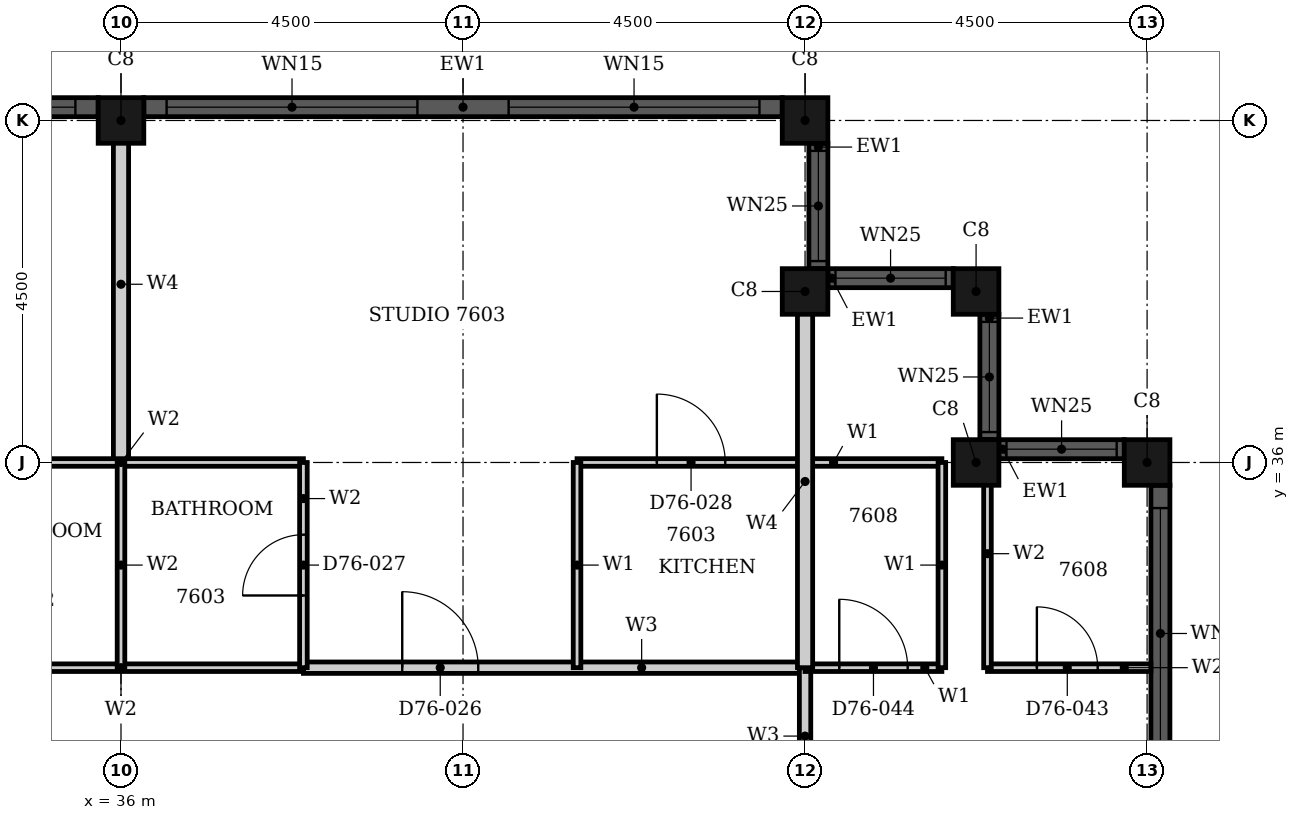
"""IFC4 building model, lengths in metres.
Left out: names, types, materials, properties, quantities, classifications, styles, units other than length and angle.
Written with IfcOpenShell. Run it as: python <this file> out.ifc"""

import sys

from ifc_helpers import new_model, si_unit, direction, frame, frame_2d, origin, origin_2d, place, context, subcontext, project, spatial, rectangle, hollow_rectangle, extrude, element, fill, save


model = new_model("IFC4")
c1 = context("Model", 3, precision=1e-05, world=origin(), true_north=direction((0.0, 1.0)))
c2 = subcontext(c1, "Body", "Model", "MODEL_VIEW")
j1 = project(units=[si_unit("LENGTHUNIT", "METRE"), si_unit("PLANEANGLEUNIT", "RADIAN")], contexts=[c1])
p1 = place(None, origin())
s1 = spatial("IfcSite", under=j1, at=p1, CompositionType="ELEMENT")
p2 = place(p1, origin())
s2 = spatial("IfcBuilding", under=s1, at=p2, CompositionType="ELEMENT")
p3 = place(p2, frame((0.0, 0.0, 298.2)))
s3 = spatial("IfcBuildingStorey", under=s2, at=p3, CompositionType="ELEMENT", Elevation=298.2)
for number, where, z_axis, x_axis in (
    (1, (49.5, 36.0, 0.0), (0.0, 0.0, 1.0), (1.0, 0.0, 0.0)),
    (2, (47.25, 36.0, 0.0), (0.0, 0.0, 1.0), (1.0, 0.0, 0.0)),
    (3, (47.25, 38.25, 0.0), (0.0, 0.0, 1.0), (1.0, 0.0, 0.0)),
    (4, (45.0, 38.25, 0.0), (0.0, 0.0, 1.0), (1.0, 0.0, 0.0)),
    (5, (45.0, 40.5, 0.0), (0.0, 0.0, 1.0), (1.0, 0.0, 0.0)),
    (6, (36.0, 40.5, 0.0), (0.0, 0.0, 1.0), (1.0, 0.0, 0.0)),
):
    element("IfcColumn", number, at=place(p3, frame(where, z_axis=z_axis, x_axis=x_axis)), inside=s3, PredefinedType="COLUMN", context=c2, shape_type="SweptSolid", body=[
        extrude(hollow_rectangle(XDim=0.6, YDim=0.6, WallThickness=0.02, at=origin_2d()), origin(), (0.0, 0.0, 1.0), 3.7),
    ])
p4 = place(p3, frame((49.675, 27.3, 0.0), z_axis=(0.0, 0.0, 1.0), x_axis=(0.0, 1.0, 0.0)))
e7 = element("IfcWall", 7, at=p4, inside=s3, PredefinedType="SOLIDWALL", context=c2, shape_type="SweptSolid", body=[
    extrude(rectangle(XDim=8.4, YDim=0.25, at=frame_2d((4.2, 0.0))), origin(), (0.0, 0.0, 1.0), 3.7),
])
p5 = place(p4, frame((0.3, 0.0, 0.45)))
e8 = element("IfcOpeningElement", 8, at=p5, cuts=e7, PredefinedType="OPENING", context=c2, shape_type="SweptSolid", body=[
    extrude(rectangle(XDim=3.3, YDim=2.3, at=frame_2d((1.65, 1.15))), frame((0.0, 0.135, 0.0), z_axis=(0.0, -1.0, 0.0), x_axis=(1.0, 0.0, 0.0)), (0.0, 0.0, 1.0), 0.27),
])
p6 = place(p4, frame((4.8, 0.0, 0.45)))
e9 = element("IfcOpeningElement", 9, at=p6, cuts=e7, PredefinedType="OPENING", context=c2, shape_type="SweptSolid", body=[
    extrude(rectangle(XDim=3.3, YDim=2.3, at=frame_2d((1.65, 1.15))), frame((0.0, 0.135, 0.0), z_axis=(0.0, -1.0, 0.0), x_axis=(1.0, 0.0, 0.0)), (0.0, 0.0, 1.0), 0.27),
])
p7 = place(p3, frame((49.2, 36.175, 0.0), z_axis=(0.0, 0.0, 1.0), x_axis=(-1.0, 0.0, 0.0)))
e10 = element("IfcWall", 10, at=p7, inside=s3, PredefinedType="SOLIDWALL", context=c2, shape_type="SweptSolid", body=[
    extrude(rectangle(XDim=1.65, YDim=0.25, at=frame_2d((0.825, 0.0))), origin(), (0.0, 0.0, 1.0), 3.7),
])
p8 = place(p7, frame((0.1, 0.0, 0.9)))
e11 = element("IfcOpeningElement", 11, at=p8, cuts=e10, PredefinedType="OPENING", context=c2, shape_type="SweptSolid", body=[
    extrude(rectangle(XDim=1.45, YDim=1.85, at=frame_2d((0.725, 0.925))), frame((0.0, 0.135, 0.0), z_axis=(0.0, -1.0, 0.0), x_axis=(1.0, 0.0, 0.0)), (0.0, 0.0, 1.0), 0.27),
])
p9 = place(p3, frame((47.425, 36.3, 0.0), z_axis=(0.0, 0.0, 1.0), x_axis=(0.0, 1.0, 0.0)))
e12 = element("IfcWall", 12, at=p9, inside=s3, PredefinedType="SOLIDWALL", context=c2, shape_type="SweptSolid", body=[
    extrude(rectangle(XDim=1.65, YDim=0.25, at=frame_2d((0.825, 0.0))), origin(), (0.0, 0.0, 1.0), 3.7),
])
p10 = place(p9, frame((0.1, 0.0, 0.9)))
e13 = element("IfcOpeningElement", 13, at=p10, cuts=e12, PredefinedType="OPENING", context=c2, shape_type="SweptSolid", body=[
    extrude(rectangle(XDim=1.45, YDim=1.85, at=frame_2d((0.725, 0.925))), frame((0.0, 0.135, 0.0), z_axis=(0.0, -1.0, 0.0), x_axis=(1.0, 0.0, 0.0)), (0.0, 0.0, 1.0), 0.27),
])
p11 = place(p3, frame((46.95, 38.425, 0.0), z_axis=(0.0, 0.0, 1.0), x_axis=(-1.0, 0.0, 0.0)))
e14 = element("IfcWall", 14, at=p11, inside=s3, PredefinedType="SOLIDWALL", context=c2, shape_type="SweptSolid", body=[
    extrude(rectangle(XDim=1.65, YDim=0.25, at=frame_2d((0.825, 0.0))), origin(), (0.0, 0.0, 1.0), 3.7),
])
p12 = place(p11, frame((0.1, 0.0, 0.9)))
e15 = element("IfcOpeningElement", 15, at=p12, cuts=e14, PredefinedType="OPENING", context=c2, shape_type="SweptSolid", body=[
    extrude(rectangle(XDim=1.45, YDim=1.85, at=frame_2d((0.725, 0.925))), frame((0.0, 0.135, 0.0), z_axis=(0.0, -1.0, 0.0), x_axis=(1.0, 0.0, 0.0)), (0.0, 0.0, 1.0), 0.27),
])
p13 = place(p3, frame((45.175, 38.55, 0.0), z_axis=(0.0, 0.0, 1.0), x_axis=(0.0, 1.0, 0.0)))
e16 = element("IfcWall", 16, at=p13, inside=s3, PredefinedType="SOLIDWALL", context=c2, shape_type="SweptSolid", body=[
    extrude(rectangle(XDim=1.65, YDim=0.25, at=frame_2d((0.825, 0.0))), origin(), (0.0, 0.0, 1.0), 3.7),
])
p14 = place(p13, frame((0.1, 0.0, 0.9)))
e17 = element("IfcOpeningElement", 17, at=p14, cuts=e16, PredefinedType="OPENING", context=c2, shape_type="SweptSolid", body=[
    extrude(rectangle(XDim=1.45, YDim=1.85, at=frame_2d((0.725, 0.925))), frame((0.0, 0.135, 0.0), z_axis=(0.0, -1.0, 0.0), x_axis=(1.0, 0.0, 0.0)), (0.0, 0.0, 1.0), 0.27),
])
p15 = place(p3, frame((44.7, 40.675, 0.0), z_axis=(0.0, 0.0, 1.0), x_axis=(-1.0, 0.0, 0.0)))
e18 = element("IfcWall", 18, at=p15, inside=s3, PredefinedType="SOLIDWALL", context=c2, shape_type="SweptSolid", body=[
    extrude(rectangle(XDim=8.4, YDim=0.25, at=frame_2d((4.2, 0.0))), origin(), (0.0, 0.0, 1.0), 3.7),
])
p16 = place(p15, frame((0.3, 0.0, 0.45)))
e19 = element("IfcOpeningElement", 19, at=p16, cuts=e18, PredefinedType="OPENING", context=c2, shape_type="SweptSolid", body=[
    extrude(rectangle(XDim=3.3, YDim=2.3, at=frame_2d((1.65, 1.15))), frame((0.0, 0.135, 0.0), z_axis=(0.0, -1.0, 0.0), x_axis=(1.0, 0.0, 0.0)), (0.0, 0.0, 1.0), 0.27),
])
p17 = place(p15, frame((4.8, 0.0, 0.45)))
e20 = element("IfcOpeningElement", 20, at=p17, cuts=e18, PredefinedType="OPENING", context=c2, shape_type="SweptSolid", body=[
    extrude(rectangle(XDim=3.3, YDim=2.3, at=frame_2d((1.65, 1.15))), frame((0.0, 0.135, 0.0), z_axis=(0.0, -1.0, 0.0), x_axis=(1.0, 0.0, 0.0)), (0.0, 0.0, 1.0), 0.27),
])
p18 = place(p3, frame((35.7, 40.675, 0.0), z_axis=(0.0, 0.0, 1.0), x_axis=(-1.0, 0.0, 0.0)))
e21 = element("IfcWall", 21, at=p18, inside=s3, PredefinedType="SOLIDWALL", context=c2, shape_type="SweptSolid", body=[
    extrude(rectangle(XDim=8.4, YDim=0.25, at=frame_2d((4.2, 0.0))), origin(), (0.0, 0.0, 1.0), 3.7),
])
p19 = place(p18, frame((0.3, 0.0, 0.45)))
e22 = element("IfcOpeningElement", 22, at=p19, cuts=e21, PredefinedType="OPENING", context=c2, shape_type="SweptSolid", body=[
    extrude(rectangle(XDim=3.3, YDim=2.3, at=frame_2d((1.65, 1.15))), frame((0.0, 0.135, 0.0), z_axis=(0.0, -1.0, 0.0), x_axis=(1.0, 0.0, 0.0)), (0.0, 0.0, 1.0), 0.27),
])
p20 = place(p18, frame((4.8, 0.0, 0.45)))
e23 = element("IfcOpeningElement", 23, at=p20, cuts=e21, PredefinedType="OPENING", context=c2, shape_type="SweptSolid", body=[
    extrude(rectangle(XDim=3.3, YDim=2.3, at=frame_2d((1.65, 1.15))), frame((0.0, 0.135, 0.0), z_axis=(0.0, -1.0, 0.0), x_axis=(1.0, 0.0, 0.0)), (0.0, 0.0, 1.0), 0.27),
])
p21 = place(p3, frame((38.4, 33.3, 0.0), z_axis=(0.0, 0.0, 1.0), x_axis=(1.0, 0.0, 0.0)))
e24 = element("IfcWall", 24, at=p21, inside=s3, PredefinedType="PARTITIONING", context=c2, shape_type="SweptSolid", body=[
    extrude(rectangle(XDim=6.6, YDim=0.15, at=frame_2d((3.3, 0.0))), origin(), (0.0, 0.0, 1.0), 3.4),
])
p22 = place(p21, frame((1.3, 0.0, 0.0)))
e25 = element("IfcOpeningElement", 25, at=p22, cuts=e24, PredefinedType="OPENING", context=c2, shape_type="SweptSolid", body=[
    extrude(rectangle(XDim=1.0, YDim=2.2, at=frame_2d((0.5, 1.1))), frame((0.0, 0.085, 0.0), z_axis=(0.0, -1.0, 0.0), x_axis=(1.0, 0.0, 0.0)), (0.0, 0.0, 1.0), 0.17),
])
p23 = place(p3, frame((45.0, 31.5, 0.0), z_axis=(0.0, 0.0, 1.0), x_axis=(0.0, 1.0, 0.0)))
e26 = element("IfcWall", 26, at=p23, inside=s3, PredefinedType="PARTITIONING", context=c2, shape_type="SweptSolid", body=[
    extrude(rectangle(XDim=1.8, YDim=0.15, at=frame_2d((0.9, 0.0))), origin(), (0.0, 0.0, 1.0), 3.4),
])
p24 = place(p3, frame((45.0, 33.3, 0.0), z_axis=(0.0, 0.0, 1.0), x_axis=(1.0, 0.0, 0.0)))
e27 = element("IfcWall", 27, at=p24, inside=s3, PredefinedType="PARTITIONING", context=c2, shape_type="SweptSolid", body=[
    extrude(rectangle(XDim=1.8, YDim=0.1, at=frame_2d((0.9, 0.0))), origin(), (0.0, 0.0, 1.0), 3.4),
])
p25 = place(p24, frame((0.45, 0.0, 0.0)))
e28 = element("IfcOpeningElement", 28, at=p25, cuts=e27, PredefinedType="OPENING", context=c2, shape_type="SweptSolid", body=[
    extrude(rectangle(XDim=0.9, YDim=2.1, at=frame_2d((0.45, 1.05))), frame((0.0, 0.06, 0.0), z_axis=(0.0, -1.0, 0.0), x_axis=(1.0, 0.0, 0.0)), (0.0, 0.0, 1.0), 0.12),
])
p26 = place(p3, frame((42.0, 36.0, 0.0), z_axis=(0.0, 0.0, 1.0), x_axis=(1.0, 0.0, 0.0)))
e29 = element("IfcWall", 29, at=p26, inside=s3, PredefinedType="PARTITIONING", context=c2, shape_type="SweptSolid", body=[
    extrude(rectangle(XDim=4.8, YDim=0.1, at=frame_2d((2.4, 0.0))), origin(), (0.0, 0.0, 1.0), 3.4),
])
p27 = place(p26, frame((1.05, 0.0, 0.0)))
e30 = element("IfcOpeningElement", 30, at=p27, cuts=e29, PredefinedType="OPENING", context=c2, shape_type="SweptSolid", body=[
    extrude(rectangle(XDim=0.9, YDim=2.1, at=frame_2d((0.45, 1.05))), frame((0.0, 0.06, 0.0), z_axis=(0.0, -1.0, 0.0), x_axis=(1.0, 0.0, 0.0)), (0.0, 0.0, 1.0), 0.12),
])
for number, where, z_axis, x_axis in (
    (31, (42.0, 33.3, 0.0), (0.0, 0.0, 1.0), (0.0, 1.0, 0.0)),
    (32, (46.8, 33.3, 0.0), (0.0, 0.0, 1.0), (0.0, 1.0, 0.0)),
):
    element("IfcWall", number, at=place(p3, frame(where, z_axis=z_axis, x_axis=x_axis)), inside=s3, PredefinedType="PARTITIONING", context=c2, shape_type="SweptSolid", body=[
        extrude(rectangle(XDim=2.7, YDim=0.1, at=frame_2d((1.35, 0.0))), origin(), (0.0, 0.0, 1.0), 3.4),
    ])
p28 = place(p3, frame((36.0, 36.0, 0.0), z_axis=(0.0, 0.0, 1.0), x_axis=(0.0, 1.0, 0.0)))
e33 = element("IfcWall", 33, at=p28, inside=s3, PredefinedType="PARTITIONING", context=c2, shape_type="SweptSolid", body=[
    extrude(rectangle(XDim=4.69, YDim=0.2, at=frame_2d((2.345, 0.0))), origin(), (0.0, 0.0, 1.0), 3.4),
])
p29 = place(p3, frame((45.0, 33.3, 0.0), z_axis=(0.0, 0.0, 1.0), x_axis=(0.0, 1.0, 0.0)))
e34 = element("IfcWall", 34, at=p29, inside=s3, PredefinedType="PARTITIONING", context=c2, shape_type="SweptSolid", body=[
    extrude(rectangle(XDim=4.9, YDim=0.2, at=frame_2d((2.45, 0.0))), origin(), (0.0, 0.0, 1.0), 3.4),
])
p30 = place(p3, frame((33.6, 33.3, 0.0), z_axis=(0.0, 0.0, 1.0), x_axis=(1.0, 0.0, 0.0)))
e35 = element("IfcWall", 35, at=p30, inside=s3, PredefinedType="PARTITIONING", context=c2, shape_type="SweptSolid", body=[
    extrude(rectangle(XDim=4.8, YDim=0.1, at=frame_2d((2.4, 0.0))), origin(), (0.0, 0.0, 1.0), 3.4),
])
p31 = place(p3, frame((47.4, 33.3, 0.0), z_axis=(0.0, 0.0, 1.0), x_axis=(1.0, 0.0, 0.0)))
e36 = element("IfcWall", 36, at=p31, inside=s3, PredefinedType="PARTITIONING", context=c2, shape_type="SweptSolid", body=[
    extrude(rectangle(XDim=2.15, YDim=0.1, at=frame_2d((1.075, 0.0))), origin(), (0.0, 0.0, 1.0), 3.4),
])
p32 = place(p31, frame((0.65, 0.0, 0.0)))
e37 = element("IfcOpeningElement", 37, at=p32, cuts=e36, PredefinedType="OPENING", context=c2, shape_type="SweptSolid", body=[
    extrude(rectangle(XDim=0.8, YDim=2.1, at=frame_2d((0.4, 1.05))), frame((0.0, 0.06, 0.0), z_axis=(0.0, -1.0, 0.0), x_axis=(1.0, 0.0, 0.0)), (0.0, 0.0, 1.0), 0.12),
])
p33 = place(p3, frame((33.6, 36.0, 0.0), z_axis=(0.0, 0.0, 1.0), x_axis=(1.0, 0.0, 0.0)))
e38 = element("IfcWall", 38, at=p33, inside=s3, PredefinedType="PARTITIONING", context=c2, shape_type="SweptSolid", body=[
    extrude(rectangle(XDim=4.8, YDim=0.1, at=frame_2d((2.4, 0.0))), origin(), (0.0, 0.0, 1.0), 3.4),
])
p34 = place(p3, frame((36.0, 33.3, 0.0), z_axis=(0.0, 0.0, 1.0), x_axis=(0.0, 1.0, 0.0)))
e39 = element("IfcWall", 39, at=p34, inside=s3, PredefinedType="PARTITIONING", context=c2, shape_type="SweptSolid", body=[
    extrude(rectangle(XDim=2.7, YDim=0.1, at=frame_2d((1.35, 0.0))), origin(), (0.0, 0.0, 1.0), 3.4),
])
p35 = place(p3, frame((38.4, 33.3, 0.0), z_axis=(0.0, 0.0, 1.0), x_axis=(0.0, 1.0, 0.0)))
e40 = element("IfcWall", 40, at=p35, inside=s3, PredefinedType="PARTITIONING", context=c2, shape_type="SweptSolid", body=[
    extrude(rectangle(XDim=2.7, YDim=0.1, at=frame_2d((1.35, 0.0))), origin(), (0.0, 0.0, 1.0), 3.4),
])
p36 = place(p35, frame((0.95, 0.0, 0.0)))
e41 = element("IfcOpeningElement", 41, at=p36, cuts=e40, PredefinedType="OPENING", context=c2, shape_type="SweptSolid", body=[
    extrude(rectangle(XDim=0.8, YDim=2.1, at=frame_2d((0.4, 1.05))), frame((0.0, 0.06, 0.0), z_axis=(0.0, -1.0, 0.0), x_axis=(1.0, 0.0, 0.0)), (0.0, 0.0, 1.0), 0.12),
])
p37 = place(p3, frame((47.4, 33.3, 0.0), z_axis=(0.0, 0.0, 1.0), x_axis=(0.0, 1.0, 0.0)))
e42 = element("IfcWall", 42, at=p37, inside=s3, PredefinedType="PARTITIONING", context=c2, shape_type="SweptSolid", body=[
    extrude(rectangle(XDim=3.0, YDim=0.1, at=frame_2d((1.5, 0.0))), origin(), (0.0, 0.0, 1.0), 3.4),
])
p38 = place(p6, origin())
e43 = element("IfcWindow", 43, at=p38, inside=s3, PartitioningType="SINGLE_PANEL", PredefinedType="WINDOW", context=c2, shape_type="SweptSolid", body=[
    extrude(rectangle(XDim=3.3, YDim=2.3, at=frame_2d((1.65, 1.15))), frame((0.0, 0.03, 0.0), z_axis=(0.0, -1.0, 0.0), x_axis=(1.0, 0.0, 0.0)), (0.0, 0.0, 1.0), 0.06),
])
fill(e9, e43)
p39 = place(p8, origin())
e44 = element("IfcWindow", 44, at=p39, inside=s3, PartitioningType="SINGLE_PANEL", PredefinedType="WINDOW", context=c2, shape_type="SweptSolid", body=[
    extrude(rectangle(XDim=1.45, YDim=1.85, at=frame_2d((0.725, 0.925))), frame((0.0, 0.03, 0.0), z_axis=(0.0, -1.0, 0.0), x_axis=(1.0, 0.0, 0.0)), (0.0, 0.0, 1.0), 0.06),
])
fill(e11, e44)
p40 = place(p10, origin())
e45 = element("IfcWindow", 45, at=p40, inside=s3, PartitioningType="SINGLE_PANEL", PredefinedType="WINDOW", context=c2, shape_type="SweptSolid", body=[
    extrude(rectangle(XDim=1.45, YDim=1.85, at=frame_2d((0.725, 0.925))), frame((0.0, 0.03, 0.0), z_axis=(0.0, -1.0, 0.0), x_axis=(1.0, 0.0, 0.0)), (0.0, 0.0, 1.0), 0.06),
])
fill(e13, e45)
p41 = place(p12, origin())
e46 = element("IfcWindow", 46, at=p41, inside=s3, PartitioningType="SINGLE_PANEL", PredefinedType="WINDOW", context=c2, shape_type="SweptSolid", body=[
    extrude(rectangle(XDim=1.45, YDim=1.85, at=frame_2d((0.725, 0.925))), frame((0.0, 0.03, 0.0), z_axis=(0.0, -1.0, 0.0), x_axis=(1.0, 0.0, 0.0)), (0.0, 0.0, 1.0), 0.06),
])
fill(e15, e46)
p42 = place(p14, origin())
e47 = element("IfcWindow", 47, at=p42, inside=s3, PartitioningType="SINGLE_PANEL", PredefinedType="WINDOW", context=c2, shape_type="SweptSolid", body=[
    extrude(rectangle(XDim=1.45, YDim=1.85, at=frame_2d((0.725, 0.925))), frame((0.0, 0.03, 0.0), z_axis=(0.0, -1.0, 0.0), x_axis=(1.0, 0.0, 0.0)), (0.0, 0.0, 1.0), 0.06),
])
fill(e17, e47)
p43 = place(p16, origin())
e48 = element("IfcWindow", 48, at=p43, inside=s3, PartitioningType="SINGLE_PANEL", PredefinedType="WINDOW", context=c2, shape_type="SweptSolid", body=[
    extrude(rectangle(XDim=3.3, YDim=2.3, at=frame_2d((1.65, 1.15))), frame((0.0, 0.03, 0.0), z_axis=(0.0, -1.0, 0.0), x_axis=(1.0, 0.0, 0.0)), (0.0, 0.0, 1.0), 0.06),
])
fill(e19, e48)
p44 = place(p17, origin())
e49 = element("IfcWindow", 49, at=p44, inside=s3, PartitioningType="SINGLE_PANEL", PredefinedType="WINDOW", context=c2, shape_type="SweptSolid", body=[
    extrude(rectangle(XDim=3.3, YDim=2.3, at=frame_2d((1.65, 1.15))), frame((0.0, 0.03, 0.0), z_axis=(0.0, -1.0, 0.0), x_axis=(1.0, 0.0, 0.0)), (0.0, 0.0, 1.0), 0.06),
])
fill(e20, e49)
p45 = place(p19, origin())
e50 = element("IfcWindow", 50, at=p45, inside=s3, PartitioningType="SINGLE_PANEL", PredefinedType="WINDOW", context=c2, shape_type="SweptSolid", body=[
    extrude(rectangle(XDim=3.3, YDim=2.3, at=frame_2d((1.65, 1.15))), frame((0.0, 0.03, 0.0), z_axis=(0.0, -1.0, 0.0), x_axis=(1.0, 0.0, 0.0)), (0.0, 0.0, 1.0), 0.06),
])
fill(e22, e50)
p46 = place(p22, origin())
e51 = element("IfcDoor", 51, at=p46, inside=s3, OperationType="SINGLE_SWING_RIGHT", PredefinedType="DOOR", context=c2, shape_type="SweptSolid", body=[
    extrude(rectangle(XDim=1.0, YDim=2.2, at=frame_2d((0.5, 1.1))), frame((0.0, 0.025, 0.0), z_axis=(0.0, -1.0, 0.0), x_axis=(1.0, 0.0, 0.0)), (0.0, 0.0, 1.0), 0.05),
])
fill(e25, e51)
p47 = place(p36, origin())
e52 = element("IfcDoor", 52, at=p47, inside=s3, OperationType="SINGLE_SWING_LEFT", PredefinedType="DOOR", context=c2, shape_type="SweptSolid", body=[
    extrude(rectangle(XDim=0.8, YDim=2.1, at=frame_2d((0.4, 1.05))), frame((0.0, 0.025, 0.0), z_axis=(0.0, -1.0, 0.0), x_axis=(1.0, 0.0, 0.0)), (0.0, 0.0, 1.0), 0.05),
])
fill(e41, e52)
p48 = place(p27, origin())
e53 = element("IfcDoor", 53, at=p48, inside=s3, OperationType="SINGLE_SWING_RIGHT", PredefinedType="DOOR", context=c2, shape_type="SweptSolid", body=[
    extrude(rectangle(XDim=0.9, YDim=2.1, at=frame_2d((0.45, 1.05))), frame((0.0, 0.025, 0.0), z_axis=(0.0, -1.0, 0.0), x_axis=(1.0, 0.0, 0.0)), (0.0, 0.0, 1.0), 0.05),
])
fill(e30, e53)
p49 = place(p32, origin())
e54 = element("IfcDoor", 54, at=p49, inside=s3, OperationType="SINGLE_SWING_LEFT", PredefinedType="DOOR", context=c2, shape_type="SweptSolid", body=[
    extrude(rectangle(XDim=0.8, YDim=2.1, at=frame_2d((0.4, 1.05))), frame((0.0, 0.025, 0.0), z_axis=(0.0, -1.0, 0.0), x_axis=(1.0, 0.0, 0.0)), (0.0, 0.0, 1.0), 0.05),
])
fill(e37, e54)
p50 = place(p25, origin())
e55 = element("IfcDoor", 55, at=p50, inside=s3, OperationType="SINGLE_SWING_RIGHT", PredefinedType="DOOR", context=c2, shape_type="SweptSolid", body=[
    extrude(rectangle(XDim=0.9, YDim=2.1, at=frame_2d((0.45, 1.05))), frame((0.0, 0.025, 0.0), z_axis=(0.0, -1.0, 0.0), x_axis=(1.0, 0.0, 0.0)), (0.0, 0.0, 1.0), 0.05),
])
fill(e28, e55)
save(model, sys.argv[1])
